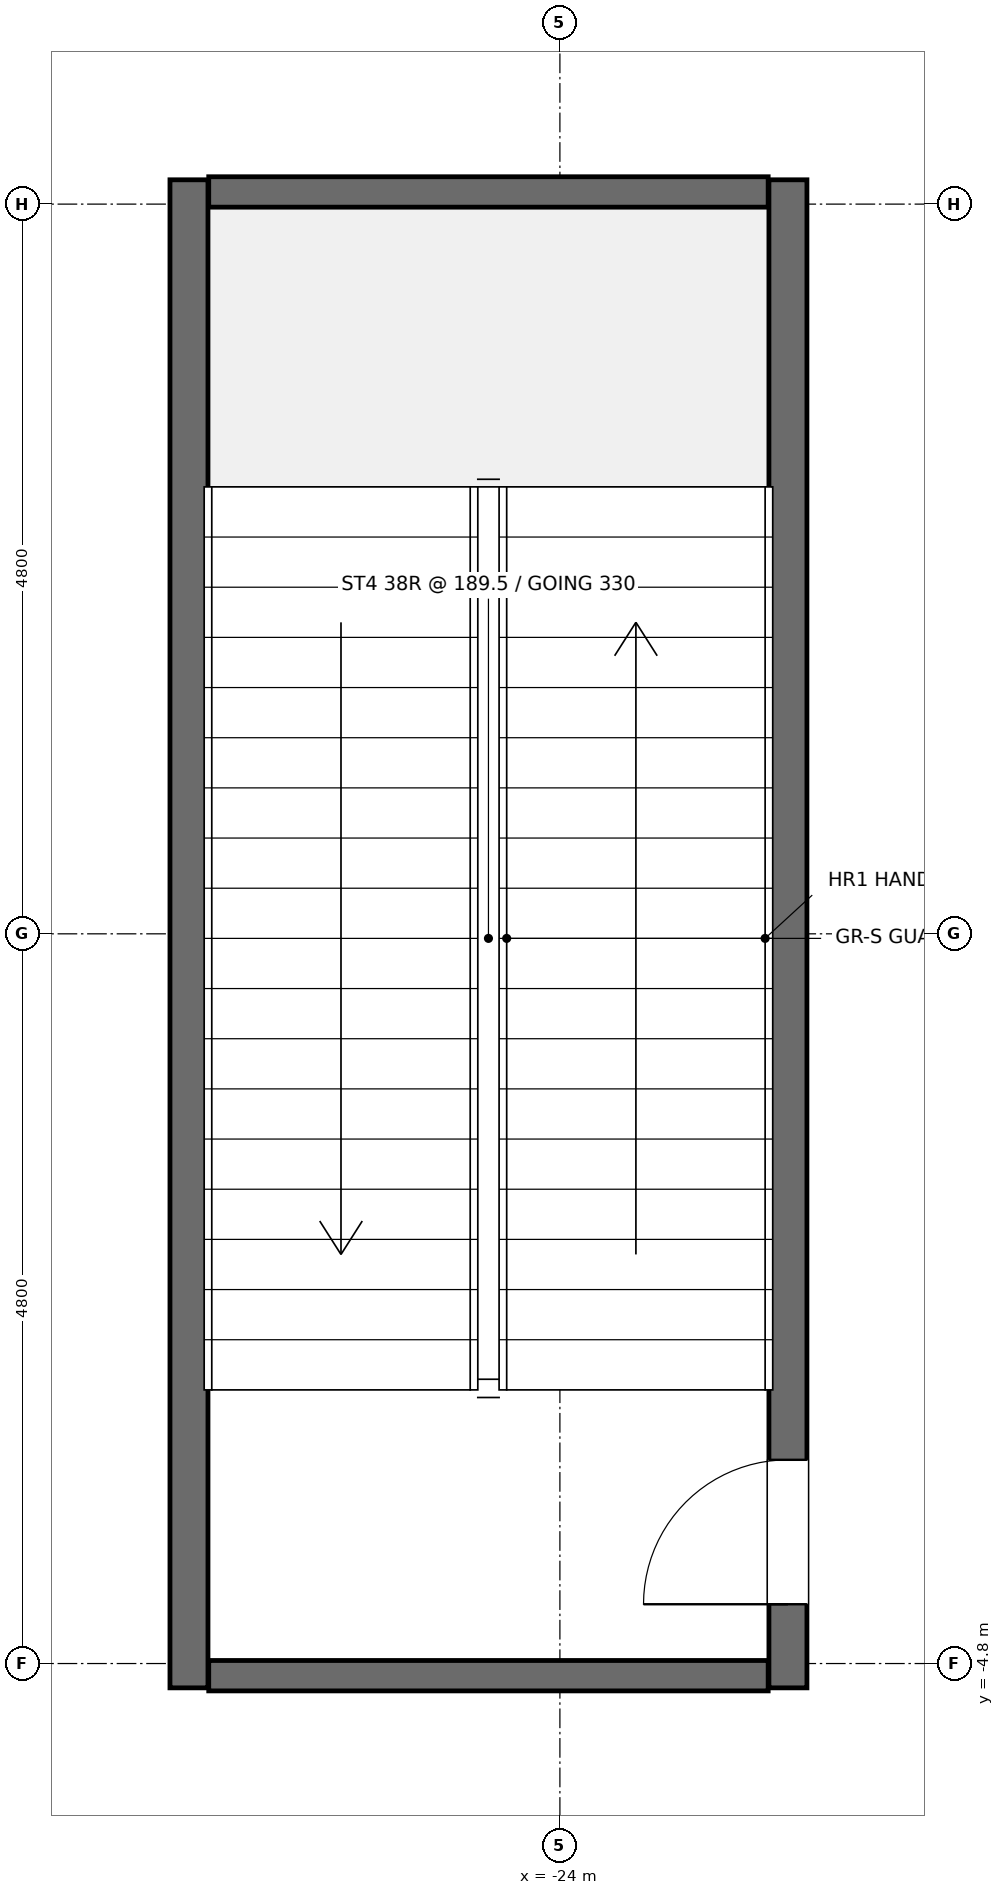
"""IFC4 building model, lengths in metres.
Left out: names, types, materials, properties, quantities, classifications, styles, units other than length and angle.
Written with IfcOpenShell. Run it as: python <this file> out.ifc"""

import sys

from ifc_helpers import new_model, si_unit, direction, frame, frame_2d, origin, place, context, subcontext, project, spatial, rectangle, extrude, element, fill, save


model = new_model("IFC4")
c1 = context("Model", 3, precision=1e-05, world=origin(), true_north=direction((0.0, 1.0)))
c2 = subcontext(c1, "Body", "Model", "MODEL_VIEW")
j1 = project(units=[si_unit("LENGTHUNIT", "METRE"), si_unit("PLANEANGLEUNIT", "RADIAN")], contexts=[c1])
p1 = place(None, origin())
s1 = spatial("IfcSite", under=j1, at=p1, CompositionType="ELEMENT")
p2 = place(p1, origin())
s2 = spatial("IfcBuilding", under=s1, at=p2, CompositionType="ELEMENT")
p3 = place(p2, frame((0.0, 0.0, 12.0)))
s3 = spatial("IfcBuildingStorey", under=s2, at=p3, CompositionType="ELEMENT", Elevation=12.0)
p4 = place(p3, frame((-22.5, -4.96, -0.22), z_axis=(0.0, 0.0, 1.0), x_axis=(0.0, 1.0, 0.0)))
e1 = element("IfcWall", 1, at=p4, inside=s3, PredefinedType="SOLIDWALL", context=c2, shape_type="SweptSolid", body=[
    extrude(rectangle(XDim=9.92, YDim=0.25, at=frame_2d((4.96, 0.0))), origin(), (0.0, 0.0, 1.0), 7.14),
])
p5 = place(p4, frame((0.55, 0.0, 0.22)))
e2 = element("IfcOpeningElement", 2, at=p5, cuts=e1, PredefinedType="OPENING", context=c2, shape_type="SweptSolid", body=[
    extrude(rectangle(XDim=0.95, YDim=2.15, at=frame_2d((0.475, 1.075))), frame((0.0, 0.14, 0.0), z_axis=(0.0, -1.0, 0.0), x_axis=(1.0, 0.0, 0.0)), (0.0, 0.0, 1.0), 0.28),
])
p6 = place(p3, frame((-26.44, -4.96, -0.22), z_axis=(0.0, 0.0, 1.0), x_axis=(0.0, 1.0, 0.0)))
e3 = element("IfcWall", 3, at=p6, inside=s3, PredefinedType="SOLIDWALL", context=c2, shape_type="SweptSolid", body=[
    extrude(rectangle(XDim=9.92, YDim=0.25, at=frame_2d((4.96, 0.0))), origin(), (0.0, 0.0, 1.0), 7.14),
])
for number, where, z_axis, x_axis in (
    (4, (-26.31, -4.88, -0.22), (0.0, 0.0, 1.0), (1.0, 0.0, 0.0)),
    (5, (-26.31, 4.88, -0.22), (0.0, 0.0, 1.0), (1.0, 0.0, 0.0)),
):
    element("IfcWall", number, at=place(p3, frame(where, z_axis=z_axis, x_axis=x_axis)), inside=s3, PredefinedType="SOLIDWALL", context=c2, shape_type="SweptSolid", body=[
        extrude(rectangle(XDim=3.68, YDim=0.2, at=frame_2d((1.84, 0.0))), origin(), (0.0, 0.0, 1.0), 7.14),
    ])
p7 = place(p5, origin())
e6 = element("IfcDoor", 6, at=p7, inside=s3, OperationType="SINGLE_SWING_LEFT", PredefinedType="DOOR", context=c2, shape_type="SweptSolid", body=[
    extrude(rectangle(XDim=0.95, YDim=2.15, at=frame_2d((0.475, 1.075))), frame((0.0, 0.025, 0.0), z_axis=(0.0, -1.0, 0.0), x_axis=(1.0, 0.0, 0.0)), (0.0, 0.0, 1.0), 0.05),
])
fill(e2, e6)
save(model, sys.argv[1])
